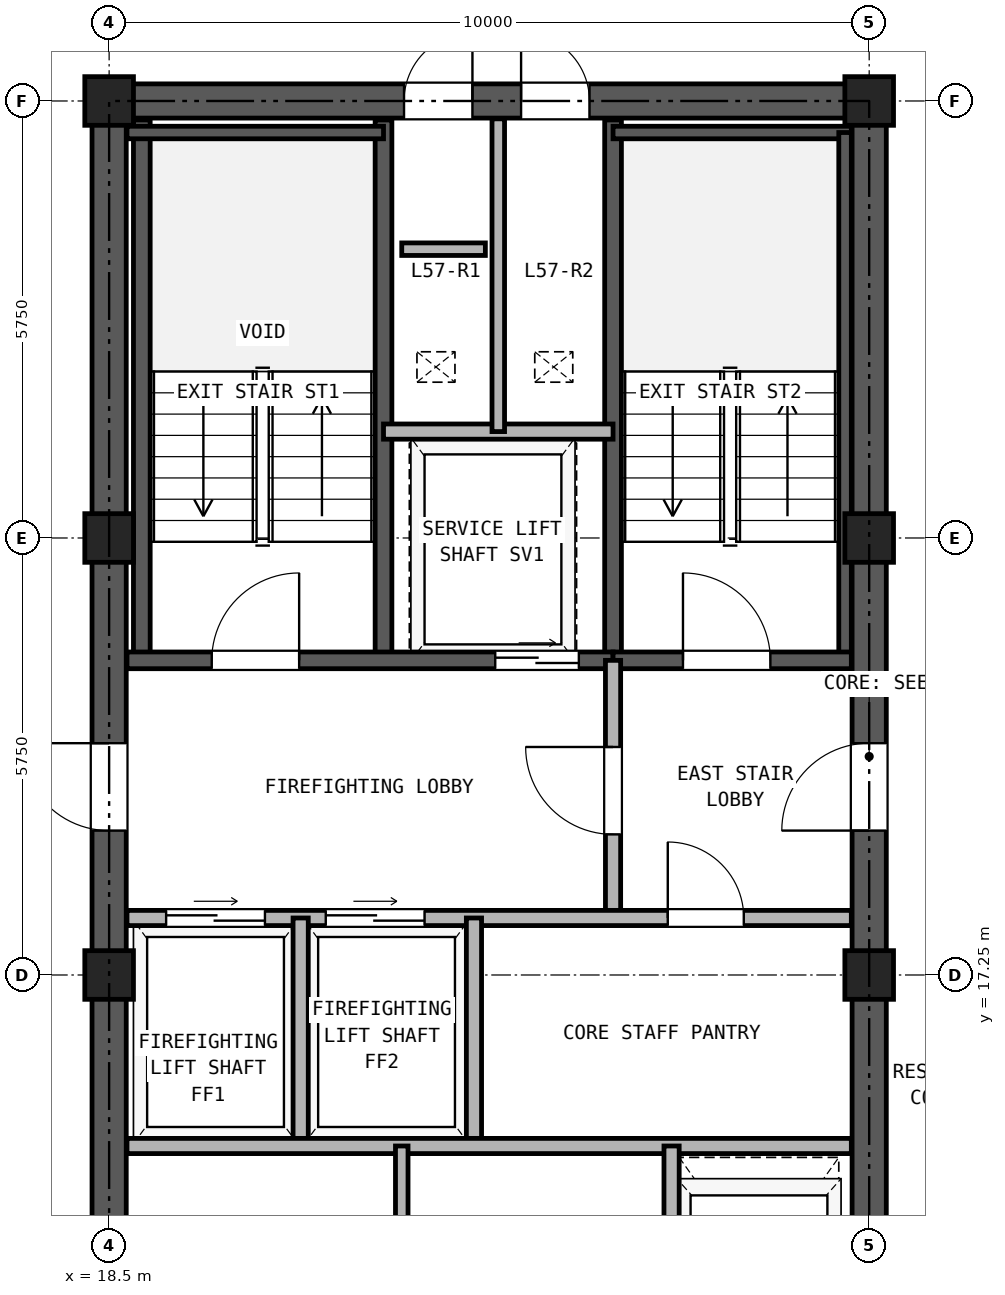
"""IFC4 building model, lengths in metres.
Left out: names, types, materials, properties, quantities, classifications, styles, units other than length and angle.
Written with IfcOpenShell. Run it as: python <this file> out.ifc"""

import sys

from ifc_helpers import new_model, si_unit, direction, frame, frame_2d, origin, origin_2d, place, context, subcontext, project, spatial, rectangle, hollow_rectangle, extrude, source, transform, mapped, element, fill, save


model = new_model("IFC4")
c1 = context("Model", 3, precision=1e-05, world=origin(), true_north=direction((0.0, 1.0)))
c2 = subcontext(c1, "Body", "Model", "MODEL_VIEW")
j1 = project(units=[si_unit("LENGTHUNIT", "METRE"), si_unit("PLANEANGLEUNIT", "RADIAN")], contexts=[c1])
p1 = place(None, origin())
s1 = spatial("IfcSite", under=j1, at=p1, CompositionType="ELEMENT")
p2 = place(p1, origin())
s2 = spatial("IfcBuilding", under=s1, at=p2, CompositionType="ELEMENT")
p3 = place(p2, frame((0.0, 0.0, 202.8)))
s3 = spatial("IfcBuildingStorey", under=s2, at=p3, CompositionType="ELEMENT", Elevation=202.8)
m1 = source(origin(), c2, "Body", "SweptSolid", [
    extrude(hollow_rectangle(XDim=0.64, YDim=0.64, WallThickness=0.035, at=origin_2d()), origin(), (0.0, 0.0, 1.0), 2.95),
])
for number, where, z_axis, x_axis in (
    (1, (18.5, 17.25, 0.0), (0.0, 0.0, 1.0), (1.0, 0.0, 0.0)),
    (2, (18.5, 23.0, 0.0), (0.0, 0.0, 1.0), (1.0, 0.0, 0.0)),
    (3, (18.5, 28.75, 0.0), (0.0, 0.0, 1.0), (1.0, 0.0, 0.0)),
    (4, (28.5, 17.25, 0.0), (0.0, 0.0, 1.0), (1.0, 0.0, 0.0)),
    (5, (28.5, 23.0, 0.0), (0.0, 0.0, 1.0), (1.0, 0.0, 0.0)),
    (6, (28.5, 28.75, 0.0), (0.0, 0.0, 1.0), (1.0, 0.0, 0.0)),
):
    element("IfcColumn", number, at=place(p3, frame(where, z_axis=z_axis, x_axis=x_axis)), inside=s3, PredefinedType="COLUMN", context=c2, shape_type="MappedRepresentation", body=[
        mapped(m1, transform((0.0, 0.0, 0.0), x_axis=(1.0, 0.0, 0.0), y_axis=(0.0, 1.0, 0.0), z_axis=(0.0, 0.0, 1.0), scale=1.0)),
    ])
p4 = place(p3, frame((18.275, 28.75, 0.0), z_axis=(0.0, 0.0, 1.0), x_axis=(1.0, 0.0, 0.0)))
e7 = element("IfcWall", 7, at=p4, inside=s3, PredefinedType="SHEAR", context=c2, shape_type="SweptSolid", body=[
    extrude(rectangle(XDim=10.45, YDim=0.45, at=frame_2d((5.225, 0.0))), origin(), (0.0, 0.0, 1.0), 2.95),
])
p5 = place(p4, frame((4.105, 0.0, 0.0)))
e8 = element("IfcOpeningElement", 8, at=p5, cuts=e7, PredefinedType="OPENING", context=c2, shape_type="SweptSolid", body=[
    extrude(rectangle(XDim=0.9, YDim=2.05, at=frame_2d((0.45, 1.025))), frame((0.0, 0.235, 0.0), z_axis=(0.0, -1.0, 0.0), x_axis=(1.0, 0.0, 0.0)), (0.0, 0.0, 1.0), 0.47),
])
p6 = place(p4, frame((5.645, 0.0, 0.0)))
e9 = element("IfcOpeningElement", 9, at=p6, cuts=e7, PredefinedType="OPENING", context=c2, shape_type="SweptSolid", body=[
    extrude(rectangle(XDim=0.9, YDim=2.05, at=frame_2d((0.45, 1.025))), frame((0.0, 0.235, 0.0), z_axis=(0.0, -1.0, 0.0), x_axis=(1.0, 0.0, 0.0)), (0.0, 0.0, 1.0), 0.47),
])
p7 = place(p3, frame((18.5, 11.725, 0.0), z_axis=(0.0, 0.0, 1.0), x_axis=(0.0, 1.0, 0.0)))
e10 = element("IfcWall", 10, at=p7, inside=s3, PredefinedType="SHEAR", context=c2, shape_type="SweptSolid", body=[
    extrude(rectangle(XDim=16.8, YDim=0.45, at=frame_2d((8.4, 0.0))), origin(), (0.0, 0.0, 1.0), 2.95),
])
p8 = place(p7, frame((7.425, 0.0, 0.0)))
e11 = element("IfcOpeningElement", 11, at=p8, cuts=e10, PredefinedType="OPENING", context=c2, shape_type="SweptSolid", body=[
    extrude(rectangle(XDim=1.15, YDim=2.2, at=frame_2d((0.575, 1.1))), frame((0.0, 0.235, 0.0), z_axis=(0.0, -1.0, 0.0), x_axis=(1.0, 0.0, 0.0)), (0.0, 0.0, 1.0), 0.47),
])
p9 = place(p3, frame((28.5, 11.725, 0.0), z_axis=(0.0, 0.0, 1.0), x_axis=(0.0, 1.0, 0.0)))
e12 = element("IfcWall", 12, at=p9, inside=s3, PredefinedType="SHEAR", context=c2, shape_type="SweptSolid", body=[
    extrude(rectangle(XDim=16.8, YDim=0.45, at=frame_2d((8.4, 0.0))), origin(), (0.0, 0.0, 1.0), 2.95),
])
p10 = place(p9, frame((7.425, 0.0, 0.0)))
e13 = element("IfcOpeningElement", 13, at=p10, cuts=e12, PredefinedType="OPENING", context=c2, shape_type="SweptSolid", body=[
    extrude(rectangle(XDim=1.15, YDim=2.2, at=frame_2d((0.575, 1.1))), frame((0.0, 0.235, 0.0), z_axis=(0.0, -1.0, 0.0), x_axis=(1.0, 0.0, 0.0)), (0.0, 0.0, 1.0), 0.47),
])
for number, where, z_axis, x_axis in (
    (14, (18.93, 21.39, 0.0), (0.0, 0.0, 1.0), (0.0, 1.0, 0.0)),
    (15, (22.11, 21.39, 0.0), (0.0, 0.0, 1.0), (0.0, 1.0, 0.0)),
    (16, (25.13, 21.39, 0.0), (0.0, 0.0, 1.0), (0.0, 1.0, 0.0)),
):
    element("IfcWall", number, at=place(p3, frame(where, z_axis=z_axis, x_axis=x_axis)), inside=s3, PredefinedType="SOLIDWALL", context=c2, shape_type="SweptSolid", body=[
        extrude(rectangle(XDim=7.11, YDim=0.22, at=frame_2d((3.555, 0.0))), origin(), (0.0, 0.0, 1.0), 2.95),
    ])
p11 = place(p3, frame((18.735, 28.335, 0.0), z_axis=(0.0, 0.0, 1.0), x_axis=(1.0, 0.0, 0.0)))
e17 = element("IfcWall", 17, at=p11, inside=s3, PredefinedType="PARTITIONING", context=c2, shape_type="SweptSolid", body=[
    extrude(rectangle(XDim=3.375, YDim=0.165, at=frame_2d((1.688, 0.0))), origin(), (0.0, 0.0, 1.0), 2.95),
])
p12 = place(p3, frame((25.13, 28.335, 0.0), z_axis=(0.0, 0.0, 1.0), x_axis=(1.0, 0.0, 0.0)))
e18 = element("IfcWall", 18, at=p12, inside=s3, PredefinedType="PARTITIONING", context=c2, shape_type="SweptSolid", body=[
    extrude(rectangle(XDim=3.135, YDim=0.165, at=frame_2d((1.567, 0.0))), origin(), (0.0, 0.0, 1.0), 2.95),
])
p13 = place(p3, frame((28.183, 21.39, 0.0), z_axis=(0.0, 0.0, 1.0), x_axis=(0.0, 1.0, 0.0)))
e19 = element("IfcWall", 19, at=p13, inside=s3, PredefinedType="PARTITIONING", context=c2, shape_type="SweptSolid", body=[
    extrude(rectangle(XDim=6.945, YDim=0.165, at=frame_2d((3.473, 0.0))), origin(), (0.0, 0.0, 1.0), 2.95),
])
p14 = place(p3, frame((18.735, 21.39, 0.0), z_axis=(0.0, 0.0, 1.0), x_axis=(1.0, 0.0, 0.0)))
e20 = element("IfcWall", 20, at=p14, inside=s3, PredefinedType="SOLIDWALL", context=c2, shape_type="SweptSolid", body=[
    extrude(rectangle(XDim=6.395, YDim=0.22, at=frame_2d((3.197, 0.0))), origin(), (0.0, 0.0, 1.0), 2.95),
])
p15 = place(p14, frame((1.115, 0.0, 0.0)))
e21 = element("IfcOpeningElement", 21, at=p15, cuts=e20, PredefinedType="OPENING", context=c2, shape_type="SweptSolid", body=[
    extrude(rectangle(XDim=1.15, YDim=2.2, at=frame_2d((0.575, 1.1))), frame((0.0, 0.12, 0.0), z_axis=(0.0, -1.0, 0.0), x_axis=(1.0, 0.0, 0.0)), (0.0, 0.0, 1.0), 0.24),
])
p16 = place(p14, frame((4.845, 0.0, 0.0)))
e22 = element("IfcOpeningElement", 22, at=p16, cuts=e20, PredefinedType="OPENING", context=c2, shape_type="SweptSolid", body=[
    extrude(rectangle(XDim=1.1, YDim=2.25, at=frame_2d((0.55, 1.125))), frame((0.0, 0.12, 0.0), z_axis=(0.0, -1.0, 0.0), x_axis=(1.0, 0.0, 0.0)), (0.0, 0.0, 1.0), 0.24),
])
p17 = place(p3, frame((25.13, 21.39, 0.0), z_axis=(0.0, 0.0, 1.0), x_axis=(1.0, 0.0, 0.0)))
e23 = element("IfcWall", 23, at=p17, inside=s3, PredefinedType="SOLIDWALL", context=c2, shape_type="SweptSolid", body=[
    extrude(rectangle(XDim=3.135, YDim=0.22, at=frame_2d((1.567, 0.0))), origin(), (0.0, 0.0, 1.0), 2.95),
])
p18 = place(p17, frame((0.92, 0.0, 0.0)))
e24 = element("IfcOpeningElement", 24, at=p18, cuts=e23, PredefinedType="OPENING", context=c2, shape_type="SweptSolid", body=[
    extrude(rectangle(XDim=1.15, YDim=2.2, at=frame_2d((0.575, 1.1))), frame((0.0, 0.12, 0.0), z_axis=(0.0, -1.0, 0.0), x_axis=(1.0, 0.0, 0.0)), (0.0, 0.0, 1.0), 0.24),
])
p19 = place(p3, frame((22.11, 24.4, 0.0), z_axis=(0.0, 0.0, 1.0), x_axis=(1.0, 0.0, 0.0)))
e25 = element("IfcWall", 25, at=p19, inside=s3, PredefinedType="PARTITIONING", context=c2, shape_type="SweptSolid", body=[
    extrude(rectangle(XDim=3.02, YDim=0.2, at=frame_2d((1.51, 0.0))), origin(), (0.0, 0.0, 1.0), 2.95),
])
p20 = place(p3, frame((23.62, 24.4, 0.0), z_axis=(0.0, 0.0, 1.0), x_axis=(0.0, 1.0, 0.0)))
e26 = element("IfcWall", 26, at=p20, inside=s3, PredefinedType="PARTITIONING", context=c2, shape_type="SweptSolid", body=[
    extrude(rectangle(XDim=4.115, YDim=0.165, at=frame_2d((2.058, 0.0))), origin(), (0.0, 0.0, 1.0), 2.95),
])
p21 = place(p3, frame((25.13, 18.0, 0.0), z_axis=(0.0, 0.0, 1.0), x_axis=(0.0, 1.0, 0.0)))
e27 = element("IfcWall", 27, at=p21, inside=s3, PredefinedType="PARTITIONING", context=c2, shape_type="SweptSolid", body=[
    extrude(rectangle(XDim=3.39, YDim=0.2, at=frame_2d((1.695, 0.0))), origin(), (0.0, 0.0, 1.0), 2.95),
])
p22 = place(p21, frame((1.1, 0.0, 0.0)))
e28 = element("IfcOpeningElement", 28, at=p22, cuts=e27, PredefinedType="OPENING", context=c2, shape_type="SweptSolid", body=[
    extrude(rectangle(XDim=1.15, YDim=2.2, at=frame_2d((0.575, 1.1))), frame((0.0, 0.11, 0.0), z_axis=(0.0, -1.0, 0.0), x_axis=(1.0, 0.0, 0.0)), (0.0, 0.0, 1.0), 0.22),
])
p23 = place(p3, frame((18.735, 18.0, 0.0), z_axis=(0.0, 0.0, 1.0), x_axis=(1.0, 0.0, 0.0)))
e29 = element("IfcWall", 29, at=p23, inside=s3, PredefinedType="PARTITIONING", context=c2, shape_type="SweptSolid", body=[
    extrude(rectangle(XDim=9.53, YDim=0.2, at=frame_2d((4.765, 0.0))), origin(), (0.0, 0.0, 1.0), 2.95),
])
p24 = place(p23, frame((0.515, 0.0, 0.0)))
e30 = element("IfcOpeningElement", 30, at=p24, cuts=e29, PredefinedType="OPENING", context=c2, shape_type="SweptSolid", body=[
    extrude(rectangle(XDim=1.3, YDim=2.3, at=frame_2d((0.65, 1.15))), frame((0.0, 0.11, 0.0), z_axis=(0.0, -1.0, 0.0), x_axis=(1.0, 0.0, 0.0)), (0.0, 0.0, 1.0), 0.22),
])
p25 = place(p23, frame((2.615, 0.0, 0.0)))
e31 = element("IfcOpeningElement", 31, at=p25, cuts=e29, PredefinedType="OPENING", context=c2, shape_type="SweptSolid", body=[
    extrude(rectangle(XDim=1.3, YDim=2.3, at=frame_2d((0.65, 1.15))), frame((0.0, 0.11, 0.0), z_axis=(0.0, -1.0, 0.0), x_axis=(1.0, 0.0, 0.0)), (0.0, 0.0, 1.0), 0.22),
])
p26 = place(p23, frame((7.115, 0.0, 0.0)))
e32 = element("IfcOpeningElement", 32, at=p26, cuts=e29, PredefinedType="OPENING", context=c2, shape_type="SweptSolid", body=[
    extrude(rectangle(XDim=1.0, YDim=2.15, at=frame_2d((0.5, 1.075))), frame((0.0, 0.11, 0.0), z_axis=(0.0, -1.0, 0.0), x_axis=(1.0, 0.0, 0.0)), (0.0, 0.0, 1.0), 0.22),
])
for number, where, z_axis, x_axis in (
    (33, (21.02, 15.0, 0.0), (0.0, 0.0, 1.0), (0.0, 1.0, 0.0)),
    (34, (23.3, 15.0, 0.0), (0.0, 0.0, 1.0), (0.0, 1.0, 0.0)),
):
    element("IfcWall", number, at=place(p3, frame(where, z_axis=z_axis, x_axis=x_axis)), inside=s3, PredefinedType="PARTITIONING", context=c2, shape_type="SweptSolid", body=[
        extrude(rectangle(XDim=3.0, YDim=0.2, at=frame_2d((1.5, 0.0))), origin(), (0.0, 0.0, 1.0), 2.95),
    ])
p27 = place(p3, frame((18.735, 15.0, 0.0), z_axis=(0.0, 0.0, 1.0), x_axis=(1.0, 0.0, 0.0)))
e35 = element("IfcWall", 35, at=p27, inside=s3, PredefinedType="PARTITIONING", context=c2, shape_type="SweptSolid", body=[
    extrude(rectangle(XDim=9.53, YDim=0.2, at=frame_2d((4.765, 0.0))), origin(), (0.0, 0.0, 1.0), 2.95),
])
p28 = place(p3, frame((22.35, 11.735, 0.0), z_axis=(0.0, 0.0, 1.0), x_axis=(0.0, 1.0, 0.0)))
e36 = element("IfcWall", 36, at=p28, inside=s3, PredefinedType="PARTITIONING", context=c2, shape_type="SweptSolid", body=[
    extrude(rectangle(XDim=3.265, YDim=0.165, at=frame_2d((1.632, 0.0))), origin(), (0.0, 0.0, 1.0), 2.95),
])
p29 = place(p3, frame((25.9, 11.735, 0.0), z_axis=(0.0, 0.0, 1.0), x_axis=(0.0, 1.0, 0.0)))
e37 = element("IfcWall", 37, at=p29, inside=s3, PredefinedType="PARTITIONING", context=c2, shape_type="SweptSolid", body=[
    extrude(rectangle(XDim=3.265, YDim=0.2, at=frame_2d((1.632, 0.0))), origin(), (0.0, 0.0, 1.0), 2.95),
])
p30 = place(p3, frame((22.35, 26.8, 0.0), z_axis=(0.0, 0.0, 1.0), x_axis=(1.0, 0.0, 0.0)))
e38 = element("IfcWall", 38, at=p30, inside=s3, PredefinedType="PARTITIONING", context=c2, shape_type="SweptSolid", body=[
    extrude(rectangle(XDim=1.1, YDim=0.165, at=frame_2d((0.55, 0.0))), origin(), (0.0, 0.0, 1.0), 2.95),
])
p31 = place(p15, frame((1.15, 0.0, 0.0), z_axis=(0.0, 0.0, 1.0), x_axis=(-1.0, 0.0, 0.0)))
e39 = element("IfcDoor", 39, at=p31, inside=s3, OperationType="SINGLE_SWING_RIGHT", PredefinedType="DOOR", context=c2, shape_type="SweptSolid", body=[
    extrude(rectangle(XDim=1.15, YDim=2.2, at=frame_2d((0.575, 1.1))), frame((0.0, 0.025, 0.0), z_axis=(0.0, -1.0, 0.0), x_axis=(1.0, 0.0, 0.0)), (0.0, 0.0, 1.0), 0.05),
])
fill(e21, e39)
p32 = place(p18, frame((1.15, 0.0, 0.0), z_axis=(0.0, 0.0, 1.0), x_axis=(-1.0, 0.0, 0.0)))
e40 = element("IfcDoor", 40, at=p32, inside=s3, OperationType="SINGLE_SWING_LEFT", PredefinedType="DOOR", context=c2, shape_type="SweptSolid", body=[
    extrude(rectangle(XDim=1.15, YDim=2.2, at=frame_2d((0.575, 1.1))), frame((0.0, 0.025, 0.0), z_axis=(0.0, -1.0, 0.0), x_axis=(1.0, 0.0, 0.0)), (0.0, 0.0, 1.0), 0.05),
])
fill(e24, e40)
p33 = place(p16, frame((1.1, 0.0, 0.0), z_axis=(0.0, 0.0, 1.0), x_axis=(-1.0, 0.0, 0.0)))
e41 = element("IfcDoor", 41, at=p33, inside=s3, OperationType="DOUBLE_DOOR_SLIDING", PredefinedType="DOOR", context=c2, shape_type="SweptSolid", body=[
    extrude(rectangle(XDim=1.1, YDim=2.25, at=frame_2d((0.55, 1.125))), frame((0.0, 0.025, 0.0), z_axis=(0.0, -1.0, 0.0), x_axis=(1.0, 0.0, 0.0)), (0.0, 0.0, 1.0), 0.05),
])
fill(e22, e41)
p34 = place(p22, origin())
e42 = element("IfcDoor", 42, at=p34, inside=s3, OperationType="SINGLE_SWING_RIGHT", PredefinedType="DOOR", context=c2, shape_type="SweptSolid", body=[
    extrude(rectangle(XDim=1.15, YDim=2.2, at=frame_2d((0.575, 1.1))), frame((0.0, 0.025, 0.0), z_axis=(0.0, -1.0, 0.0), x_axis=(1.0, 0.0, 0.0)), (0.0, 0.0, 1.0), 0.05),
])
fill(e28, e42)
p35 = place(p24, origin())
e43 = element("IfcDoor", 43, at=p35, inside=s3, OperationType="DOUBLE_DOOR_SLIDING", PredefinedType="DOOR", context=c2, shape_type="SweptSolid", body=[
    extrude(rectangle(XDim=1.3, YDim=2.3, at=frame_2d((0.65, 1.15))), frame((0.0, 0.025, 0.0), z_axis=(0.0, -1.0, 0.0), x_axis=(1.0, 0.0, 0.0)), (0.0, 0.0, 1.0), 0.05),
])
fill(e30, e43)
p36 = place(p25, origin())
e44 = element("IfcDoor", 44, at=p36, inside=s3, OperationType="DOUBLE_DOOR_SLIDING", PredefinedType="DOOR", context=c2, shape_type="SweptSolid", body=[
    extrude(rectangle(XDim=1.3, YDim=2.3, at=frame_2d((0.65, 1.15))), frame((0.0, 0.025, 0.0), z_axis=(0.0, -1.0, 0.0), x_axis=(1.0, 0.0, 0.0)), (0.0, 0.0, 1.0), 0.05),
])
fill(e31, e44)
p37 = place(p26, frame((1.0, 0.0, 0.0), z_axis=(0.0, 0.0, 1.0), x_axis=(-1.0, 0.0, 0.0)))
e45 = element("IfcDoor", 45, at=p37, inside=s3, OperationType="SINGLE_SWING_LEFT", PredefinedType="DOOR", context=c2, shape_type="SweptSolid", body=[
    extrude(rectangle(XDim=1.0, YDim=2.15, at=frame_2d((0.5, 1.075))), frame((0.0, 0.025, 0.0), z_axis=(0.0, -1.0, 0.0), x_axis=(1.0, 0.0, 0.0)), (0.0, 0.0, 1.0), 0.05),
])
fill(e32, e45)
p38 = place(p8, frame((1.15, 0.0, 0.0), z_axis=(0.0, 0.0, 1.0), x_axis=(-1.0, 0.0, 0.0)))
e46 = element("IfcDoor", 46, at=p38, inside=s3, OperationType="SINGLE_SWING_RIGHT", PredefinedType="DOOR", context=c2, shape_type="SweptSolid", body=[
    extrude(rectangle(XDim=1.15, YDim=2.2, at=frame_2d((0.575, 1.1))), frame((0.0, 0.025, 0.0), z_axis=(0.0, -1.0, 0.0), x_axis=(1.0, 0.0, 0.0)), (0.0, 0.0, 1.0), 0.05),
])
fill(e11, e46)
p39 = place(p10, origin())
e47 = element("IfcDoor", 47, at=p39, inside=s3, OperationType="SINGLE_SWING_LEFT", PredefinedType="DOOR", context=c2, shape_type="SweptSolid", body=[
    extrude(rectangle(XDim=1.15, YDim=2.2, at=frame_2d((0.575, 1.1))), frame((0.0, 0.025, 0.0), z_axis=(0.0, -1.0, 0.0), x_axis=(1.0, 0.0, 0.0)), (0.0, 0.0, 1.0), 0.05),
])
fill(e13, e47)
p40 = place(p5, origin())
e48 = element("IfcDoor", 48, at=p40, inside=s3, OperationType="SINGLE_SWING_RIGHT", PredefinedType="DOOR", context=c2, shape_type="SweptSolid", body=[
    extrude(rectangle(XDim=0.9, YDim=2.05, at=frame_2d((0.45, 1.025))), frame((0.0, 0.025, 0.0), z_axis=(0.0, -1.0, 0.0), x_axis=(1.0, 0.0, 0.0)), (0.0, 0.0, 1.0), 0.05),
])
fill(e8, e48)
p41 = place(p6, origin())
e49 = element("IfcDoor", 49, at=p41, inside=s3, OperationType="SINGLE_SWING_LEFT", PredefinedType="DOOR", context=c2, shape_type="SweptSolid", body=[
    extrude(rectangle(XDim=0.9, YDim=2.05, at=frame_2d((0.45, 1.025))), frame((0.0, 0.025, 0.0), z_axis=(0.0, -1.0, 0.0), x_axis=(1.0, 0.0, 0.0)), (0.0, 0.0, 1.0), 0.05),
])
fill(e9, e49)
save(model, sys.argv[1])
